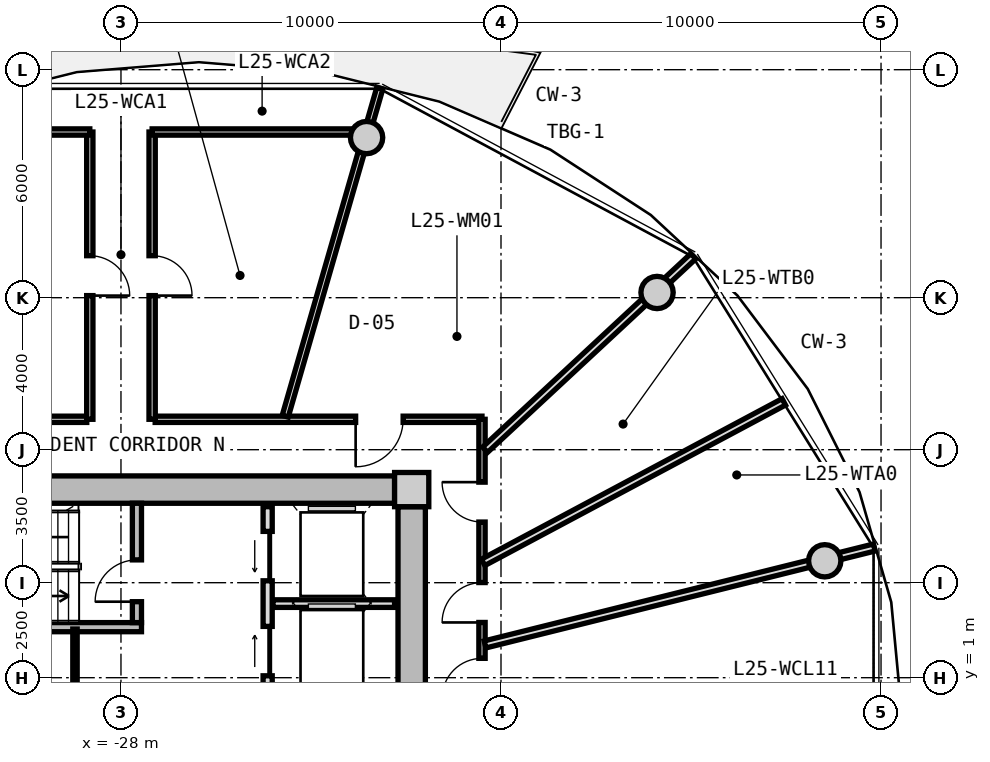
"""IFC4 building model, lengths in metres.
Left out: names, types, materials, properties, quantities, classifications, styles, units other than length and angle.
Written with IfcOpenShell. Run it as: python <this file> out.ifc"""

import sys

from ifc_helpers import new_model, si_unit, direction, frame, frame_2d, origin, origin_2d, place, context, subcontext, project, spatial, rectangle, circle, extrude, source, transform, mapped, element, fill, save


model = new_model("IFC4")
c1 = context("Model", 3, precision=1e-05, world=origin(), true_north=direction((0.0, 1.0)))
c2 = subcontext(c1, "Body", "Model", "MODEL_VIEW")
j1 = project(units=[si_unit("LENGTHUNIT", "METRE"), si_unit("PLANEANGLEUNIT", "RADIAN")], contexts=[c1])
p1 = place(None, origin())
s1 = spatial("IfcSite", under=j1, at=p1, CompositionType="ELEMENT")
p2 = place(p1, origin())
s2 = spatial("IfcBuilding", under=s1, at=p2, CompositionType="ELEMENT")
p3 = place(p2, frame((0.0, 0.0, 84.05)))
s3 = spatial("IfcBuildingStorey", under=s2, at=p3, CompositionType="ELEMENT", Elevation=84.05)
m1 = source(origin(), c2, "Body", "SweptSolid", [
    extrude(rectangle(XDim=0.9, YDim=0.9, at=origin_2d()), origin(), (0.0, 0.0, 1.0), 3.05),
])
p4 = place(p3, frame((-20.35, 5.95, 0.0), z_axis=(0.0, 0.0, 1.0), x_axis=(1.0, 0.0, 0.0)))
e1 = element("IfcColumn", 1, at=p4, inside=s3, PredefinedType="COLUMN", context=c2, shape_type="MappedRepresentation", body=[
    mapped(m1, transform((0.0, 0.0, 0.0), x_axis=(1.0, 0.0, 0.0), y_axis=(0.0, 1.0, 0.0), z_axis=(0.0, 0.0, 1.0), scale=1.0)),
])
m2 = source(origin(), c2, "Body", "SweptSolid", [
    extrude(rectangle(XDim=14.4, YDim=0.72, at=frame_2d((7.2, 0.0))), origin(), (0.0, 0.0, 1.0), 2.79),
])
p5 = place(p3, frame((-35.2, 5.95, 0.0), z_axis=(0.0, 0.0, 1.0), x_axis=(1.0, 0.0, 0.0)))
e2 = element("IfcWall", 2, at=p5, inside=s3, PredefinedType="SHEAR", context=c2, shape_type="MappedRepresentation", body=[
    mapped(m2, transform((0.0, 0.0, 0.0), x_axis=(1.0, 0.0, 0.0), y_axis=(0.0, 1.0, 0.0), z_axis=(0.0, 0.0, 1.0), scale=1.0)),
])
m3 = source(origin(), c2, "Body", "SweptSolid", [
    extrude(rectangle(XDim=11.0, YDim=0.72, at=frame_2d((5.5, 0.0))), origin(), (0.0, 0.0, 1.0), 2.79),
])
p6 = place(p3, frame((-20.35, 5.5, 0.0), z_axis=(0.0, 0.0, 1.0), x_axis=(0.0, -1.0, 0.0)))
e3 = element("IfcWall", 3, at=p6, inside=s3, PredefinedType="SHEAR", context=c2, shape_type="MappedRepresentation", body=[
    mapped(m3, transform((0.0, 0.0, 0.0), x_axis=(1.0, 0.0, 0.0), y_axis=(0.0, 1.0, 0.0), z_axis=(0.0, 0.0, 1.0), scale=1.0)),
])
p7 = place(p6, frame((5.65, 0.0, 0.0)))
e4 = element("IfcOpeningElement", 4, at=p7, cuts=e3, PredefinedType="OPENING", context=c2, shape_type="SweptSolid", body=[
    extrude(rectangle(XDim=1.2, YDim=2.15, at=frame_2d((0.6, 1.075))), frame((0.0, 0.37, 0.0), z_axis=(0.0, -1.0, 0.0), x_axis=(1.0, 0.0, 0.0)), (0.0, 0.0, 1.0), 0.74),
])
m4 = source(origin(), c2, "Body", "SweptSolid", [
    extrude(circle(Radius=0.425, at=origin_2d()), origin(), (0.0, 0.0, 1.0), 3.05),
])
for number, where, z_axis, x_axis in (
    (5, (-9.481, 4.076, 0.0), (0.0, 0.0, 1.0), (1.0, 0.0, 0.0)),
    (6, (-13.894, 11.137, 0.0), (0.0, 0.0, 1.0), (1.0, 0.0, 0.0)),
    (7, (-21.537, 15.213, 0.0), (0.0, 0.0, 1.0), (1.0, 0.0, 0.0)),
):
    element("IfcColumn", number, at=place(p3, frame(where, z_axis=z_axis, x_axis=x_axis)), inside=s3, PredefinedType="COLUMN", context=c2, shape_type="MappedRepresentation", body=[
        mapped(m4, transform((0.0, 0.0, 0.0), x_axis=(1.0, 0.0, 0.0), y_axis=(0.0, 1.0, 0.0), z_axis=(0.0, 0.0, 1.0), scale=1.0)),
    ])
m5 = source(origin(), c2, "Body", "SweptSolid", [
    extrude(rectangle(XDim=7.83, YDim=0.24, at=frame_2d((3.915, 0.0))), origin(), (0.0, 0.0, 1.0), 2.79),
])
p8 = place(p3, frame((-35.29, 2.33, 0.0), z_axis=(0.0, 0.0, 1.0), x_axis=(1.0, 0.0, 0.0)))
e8 = element("IfcWall", 8, at=p8, inside=s3, PredefinedType="PARTITIONING", context=c2, shape_type="MappedRepresentation", body=[
    mapped(m5, transform((0.0, 0.0, 0.0), x_axis=(1.0, 0.0, 0.0), y_axis=(0.0, 1.0, 0.0), z_axis=(0.0, 0.0, 1.0), scale=1.0)),
])
m6 = source(origin(), c2, "Body", "SweptSolid", [
    extrude(rectangle(XDim=3.14, YDim=0.24, at=frame_2d((1.57, 0.0))), origin(), (0.0, 0.0, 1.0), 2.79),
])
p9 = place(p3, frame((-27.58, 2.45, 0.0), z_axis=(0.0, 0.0, 1.0), x_axis=(0.0, 1.0, 0.0)))
e9 = element("IfcWall", 9, at=p9, inside=s3, PredefinedType="PARTITIONING", context=c2, shape_type="MappedRepresentation", body=[
    mapped(m6, transform((0.0, 0.0, 0.0), x_axis=(1.0, 0.0, 0.0), y_axis=(0.0, 1.0, 0.0), z_axis=(0.0, 0.0, 1.0), scale=1.0)),
])
p10 = place(p9, frame((0.55, 0.0, 0.0)))
e10 = element("IfcOpeningElement", 10, at=p10, cuts=e9, PredefinedType="OPENING", context=c2, shape_type="SweptSolid", body=[
    extrude(rectangle(XDim=1.1, YDim=2.15, at=frame_2d((0.55, 1.075))), frame((0.0, 0.13, 0.0), z_axis=(0.0, -1.0, 0.0), x_axis=(1.0, 0.0, 0.0)), (0.0, 0.0, 1.0), 0.26),
])
m7 = source(origin(), c2, "Body", "SweptSolid", [
    extrude(rectangle(XDim=5.0, YDim=0.24, at=frame_2d((2.5, 0.0))), origin(), (0.0, 0.0, 1.0), 2.775),
])
p11 = place(p3, frame((-24.14, 0.5, 0.0), z_axis=(0.0, 0.0, 1.0), x_axis=(0.0, 1.0, 0.0)))
e11 = element("IfcWall", 11, at=p11, inside=s3, PredefinedType="PARTITIONING", context=c2, shape_type="MappedRepresentation", body=[
    mapped(m7, transform((0.0, 0.0, 0.0), x_axis=(1.0, 0.0, 0.0), y_axis=(0.0, 1.0, 0.0), z_axis=(0.0, 0.0, 1.0), scale=1.0)),
])
p12 = place(p11, frame((3.05, 0.0, 0.0)))
e12 = element("IfcOpeningElement", 12, at=p12, cuts=e11, PredefinedType="OPENING", context=c2, shape_type="SweptSolid", body=[
    extrude(rectangle(XDim=1.3, YDim=2.2, at=frame_2d((0.65, 1.1))), frame((0.0, 0.13, 0.0), z_axis=(0.0, -1.0, 0.0), x_axis=(1.0, 0.0, 0.0)), (0.0, 0.0, 1.0), 0.26),
])
p13 = place(p11, frame((0.55, 0.0, 0.0)))
e13 = element("IfcOpeningElement", 13, at=p13, cuts=e11, PredefinedType="OPENING", context=c2, shape_type="SweptSolid", body=[
    extrude(rectangle(XDim=1.3, YDim=2.2, at=frame_2d((0.65, 1.1))), frame((0.0, 0.13, 0.0), z_axis=(0.0, -1.0, 0.0), x_axis=(1.0, 0.0, 0.0)), (0.0, 0.0, 1.0), 0.26),
])
m8 = source(origin(), c2, "Body", "SweptSolid", [
    extrude(rectangle(XDim=3.2, YDim=0.2, at=frame_2d((1.6, 0.0))), origin(), (0.0, 0.0, 1.0), 2.775),
])
p14 = place(p3, frame((-24.0, 2.95, 0.0), z_axis=(0.0, 0.0, 1.0), x_axis=(1.0, 0.0, 0.0)))
e14 = element("IfcWall", 14, at=p14, inside=s3, PredefinedType="PARTITIONING", context=c2, shape_type="MappedRepresentation", body=[
    mapped(m8, transform((0.0, 0.0, 0.0), x_axis=(1.0, 0.0, 0.0), y_axis=(0.0, 1.0, 0.0), z_axis=(0.0, 0.0, 1.0), scale=1.0)),
])
m9 = source(origin(), c2, "Body", "SweptSolid", [
    extrude(rectangle(XDim=2.33, YDim=0.115, at=frame_2d((1.165, 0.0))), origin(), (0.0, 0.0, 1.0), 2.775),
])
p15 = place(p3, frame((-29.21, -0.05, 0.0), z_axis=(0.0, 0.0, 1.0), x_axis=(0.0, 1.0, 0.0)))
e15 = element("IfcWall", 15, at=p15, inside=s3, PredefinedType="PARTITIONING", context=c2, shape_type="MappedRepresentation", body=[
    mapped(m9, transform((0.0, 0.0, 0.0), x_axis=(1.0, 0.0, 0.0), y_axis=(0.0, 1.0, 0.0), z_axis=(0.0, 0.0, 1.0), scale=1.0)),
])
m10 = source(origin(), c2, "Body", "SweptSolid", [
    extrude(rectangle(XDim=8.6, YDim=0.165, at=frame_2d((4.3, 0.0))), origin(), (0.0, 0.0, 1.0), 2.775),
])
p16 = place(p3, frame((-37.5, 7.8, 0.0), z_axis=(0.0, 0.0, 1.0), x_axis=(1.0, 0.0, 0.0)))
e16 = element("IfcWall", 16, at=p16, inside=s3, PredefinedType="PARTITIONING", context=c2, shape_type="MappedRepresentation", body=[
    mapped(m10, transform((0.0, 0.0, 0.0), x_axis=(1.0, 0.0, 0.0), y_axis=(0.0, 1.0, 0.0), z_axis=(0.0, 0.0, 1.0), scale=1.0)),
])
p17 = place(p3, frame((-27.1, 7.8, 0.0), z_axis=(0.0, 0.0, 1.0), x_axis=(1.0, 0.0, 0.0)))
e17 = element("IfcWall", 17, at=p17, inside=s3, PredefinedType="PARTITIONING", context=c2, shape_type="MappedRepresentation", body=[
    mapped(m10, transform((0.0, 0.0, 0.0), x_axis=(1.0, 0.0, 0.0), y_axis=(0.0, 1.0, 0.0), z_axis=(0.0, 0.0, 1.0), scale=1.0)),
])
p18 = place(p17, frame((5.275, 0.0, 0.0)))
e18 = element("IfcOpeningElement", 18, at=p18, cuts=e17, PredefinedType="OPENING", context=c2, shape_type="SweptSolid", body=[
    extrude(rectangle(XDim=1.25, YDim=2.2, at=frame_2d((0.625, 1.1))), frame((0.0, 0.093, 0.0), z_axis=(0.0, -1.0, 0.0), x_axis=(1.0, 0.0, 0.0)), (0.0, 0.0, 1.0), 0.185),
])
m11 = source(origin(), c2, "Body", "SweptSolid", [
    extrude(rectangle(XDim=15.6, YDim=0.165, at=frame_2d((7.8, 0.0))), origin(), (0.0, 0.0, 1.0), 2.775),
])
p19 = place(p3, frame((-18.5, 7.8, 0.0), z_axis=(0.0, 0.0, 1.0), x_axis=(0.0, -1.0, 0.0)))
e19 = element("IfcWall", 19, at=p19, inside=s3, PredefinedType="PARTITIONING", context=c2, shape_type="MappedRepresentation", body=[
    mapped(m11, transform((0.0, 0.0, 0.0), x_axis=(1.0, 0.0, 0.0), y_axis=(0.0, 1.0, 0.0), z_axis=(0.0, 0.0, 1.0), scale=1.0)),
])
p20 = place(p19, frame((12.002, 0.0, 0.0)))
e20 = element("IfcOpeningElement", 20, at=p20, cuts=e19, PredefinedType="OPENING", context=c2, shape_type="SweptSolid", body=[
    extrude(rectangle(XDim=1.05, YDim=2.15, at=frame_2d((0.525, 1.075))), frame((0.0, 0.093, 0.0), z_axis=(0.0, -1.0, 0.0), x_axis=(1.0, 0.0, 0.0)), (0.0, 0.0, 1.0), 0.185),
])
p21 = place(p19, frame((10.211, 0.0, 0.0)))
e21 = element("IfcOpeningElement", 21, at=p21, cuts=e19, PredefinedType="OPENING", context=c2, shape_type="SweptSolid", body=[
    extrude(rectangle(XDim=1.05, YDim=2.15, at=frame_2d((0.525, 1.075))), frame((0.0, 0.093, 0.0), z_axis=(0.0, -1.0, 0.0), x_axis=(1.0, 0.0, 0.0)), (0.0, 0.0, 1.0), 0.185),
])
p22 = place(p19, frame((7.722, 0.0, 0.0)))
e22 = element("IfcOpeningElement", 22, at=p22, cuts=e19, PredefinedType="OPENING", context=c2, shape_type="SweptSolid", body=[
    extrude(rectangle(XDim=1.05, YDim=2.15, at=frame_2d((0.525, 1.075))), frame((0.0, 0.093, 0.0), z_axis=(0.0, -1.0, 0.0), x_axis=(1.0, 0.0, 0.0)), (0.0, 0.0, 1.0), 0.185),
])
p23 = place(p19, frame((6.291, 0.0, 0.0)))
e23 = element("IfcOpeningElement", 23, at=p23, cuts=e19, PredefinedType="OPENING", context=c2, shape_type="SweptSolid", body=[
    extrude(rectangle(XDim=1.05, YDim=2.15, at=frame_2d((0.525, 1.075))), frame((0.0, 0.093, 0.0), z_axis=(0.0, -1.0, 0.0), x_axis=(1.0, 0.0, 0.0)), (0.0, 0.0, 1.0), 0.185),
])
p24 = place(p19, frame((4.296, 0.0, 0.0)))
e24 = element("IfcOpeningElement", 24, at=p24, cuts=e19, PredefinedType="OPENING", context=c2, shape_type="SweptSolid", body=[
    extrude(rectangle(XDim=1.05, YDim=2.15, at=frame_2d((0.525, 1.075))), frame((0.0, 0.093, 0.0), z_axis=(0.0, -1.0, 0.0), x_axis=(1.0, 0.0, 0.0)), (0.0, 0.0, 1.0), 0.185),
])
p25 = place(p19, frame((1.654, 0.0, 0.0)))
e25 = element("IfcOpeningElement", 25, at=p25, cuts=e19, PredefinedType="OPENING", context=c2, shape_type="SweptSolid", body=[
    extrude(rectangle(XDim=1.05, YDim=2.15, at=frame_2d((0.525, 1.075))), frame((0.0, 0.093, 0.0), z_axis=(0.0, -1.0, 0.0), x_axis=(1.0, 0.0, 0.0)), (0.0, 0.0, 1.0), 0.185),
])
m12 = source(origin(), c2, "Body", "SweptSolid", [
    extrude(rectangle(XDim=8.989, YDim=0.165, at=frame_2d((4.495, 0.0))), origin(), (0.0, 0.0, 1.0), 2.275),
])
p26 = place(p3, frame((-23.678, 7.88, 0.0), z_axis=(0.0, 0.0, 1.0), x_axis=(0.27702323008, 0.960863221274, 0.0)))
e26 = element("IfcWall", 26, at=p26, inside=s3, PredefinedType="PARTITIONING", context=c2, shape_type="MappedRepresentation", body=[
    mapped(m12, transform((0.0, 0.0, 0.0), x_axis=(1.0, 0.0, 0.0), y_axis=(0.0, 1.0, 0.0), z_axis=(0.0, 0.0, 1.0), scale=1.0)),
])
m13 = source(origin(), c2, "Body", "SweptSolid", [
    extrude(rectangle(XDim=7.56, YDim=0.165, at=frame_2d((3.78, 0.0))), origin(), (0.0, 0.0, 1.0), 2.775),
])
p27 = place(p3, frame((-28.82, 7.8, 0.0), z_axis=(0.0, 0.0, 1.0), x_axis=(0.0, 1.0, 0.0)))
e27 = element("IfcWall", 27, at=p27, inside=s3, PredefinedType="PARTITIONING", context=c2, shape_type="MappedRepresentation", body=[
    mapped(m13, transform((0.0, 0.0, 0.0), x_axis=(1.0, 0.0, 0.0), y_axis=(0.0, 1.0, 0.0), z_axis=(0.0, 0.0, 1.0), scale=1.0)),
])
p28 = place(p27, frame((3.255, 0.0, 0.0)))
e28 = element("IfcOpeningElement", 28, at=p28, cuts=e27, PredefinedType="OPENING", context=c2, shape_type="SweptSolid", body=[
    extrude(rectangle(XDim=1.05, YDim=2.15, at=frame_2d((0.525, 1.075))), frame((0.0, 0.093, 0.0), z_axis=(0.0, -1.0, 0.0), x_axis=(1.0, 0.0, 0.0)), (0.0, 0.0, 1.0), 0.185),
])
m14 = source(origin(), c2, "Body", "SweptSolid", [
    extrude(rectangle(XDim=4.307, YDim=0.165, at=frame_2d((2.153, 0.0))), origin(), (0.0, 0.0, 1.0), 2.275),
])
p29 = place(p3, frame((-33.127, 15.36, 0.0), z_axis=(0.0, 0.0, 1.0), x_axis=(1.0, 0.0, 0.0)))
e29 = element("IfcWall", 29, at=p29, inside=s3, PredefinedType="PARTITIONING", context=c2, shape_type="MappedRepresentation", body=[
    mapped(m14, transform((0.0, 0.0, 0.0), x_axis=(1.0, 0.0, 0.0), y_axis=(0.0, 1.0, 0.0), z_axis=(0.0, 0.0, 1.0), scale=1.0)),
])
p30 = place(p3, frame((-27.18, 7.8, 0.0), z_axis=(0.0, 0.0, 1.0), x_axis=(0.0, 1.0, 0.0)))
e30 = element("IfcWall", 30, at=p30, inside=s3, PredefinedType="PARTITIONING", context=c2, shape_type="MappedRepresentation", body=[
    mapped(m13, transform((0.0, 0.0, 0.0), x_axis=(1.0, 0.0, 0.0), y_axis=(0.0, 1.0, 0.0), z_axis=(0.0, 0.0, 1.0), scale=1.0)),
])
p31 = place(p30, frame((3.255, 0.0, 0.0)))
e31 = element("IfcOpeningElement", 31, at=p31, cuts=e30, PredefinedType="OPENING", context=c2, shape_type="SweptSolid", body=[
    extrude(rectangle(XDim=1.05, YDim=2.15, at=frame_2d((0.525, 1.075))), frame((0.0, 0.093, 0.0), z_axis=(0.0, -1.0, 0.0), x_axis=(1.0, 0.0, 0.0)), (0.0, 0.0, 1.0), 0.185),
])
m15 = source(origin(), c2, "Body", "SweptSolid", [
    extrude(rectangle(XDim=5.814, YDim=0.165, at=frame_2d((2.907, 0.0))), origin(), (0.0, 0.0, 1.0), 2.275),
])
p32 = place(p3, frame((-27.18, 15.36, 0.0), z_axis=(0.0, 0.0, 1.0), x_axis=(1.0, 0.0, 0.0)))
e32 = element("IfcWall", 32, at=p32, inside=s3, PredefinedType="PARTITIONING", context=c2, shape_type="MappedRepresentation", body=[
    mapped(m15, transform((0.0, 0.0, 0.0), x_axis=(1.0, 0.0, 0.0), y_axis=(0.0, 1.0, 0.0), z_axis=(0.0, 0.0, 1.0), scale=1.0)),
])
m16 = source(origin(), c2, "Body", "SweptSolid", [
    extrude(rectangle(XDim=10.556, YDim=0.19, at=frame_2d((5.278, 0.0))), origin(), (0.0, 0.0, 1.0), 2.275),
])
p33 = place(p3, frame((-18.42, 1.875, 0.0), z_axis=(0.0, 0.0, 1.0), x_axis=(0.970363857851, 0.241648470667, 0.0)))
e33 = element("IfcWall", 33, at=p33, inside=s3, PredefinedType="PARTITIONING", context=c2, shape_type="MappedRepresentation", body=[
    mapped(m16, transform((0.0, 0.0, 0.0), x_axis=(1.0, 0.0, 0.0), y_axis=(0.0, 1.0, 0.0), z_axis=(0.0, 0.0, 1.0), scale=1.0)),
])
m17 = source(origin(), c2, "Body", "SweptSolid", [
    extrude(rectangle(XDim=7.482, YDim=0.19, at=frame_2d((3.741, 0.0))), origin(), (0.0, 0.0, 1.0), 2.275),
])
p34 = place(p3, frame((-18.42, 6.998, 0.0), z_axis=(0.0, 0.0, 1.0), x_axis=(0.732508698043, 0.680757671489, 0.0)))
e34 = element("IfcWall", 34, at=p34, inside=s3, PredefinedType="PARTITIONING", context=c2, shape_type="MappedRepresentation", body=[
    mapped(m17, transform((0.0, 0.0, 0.0), x_axis=(1.0, 0.0, 0.0), y_axis=(0.0, 1.0, 0.0), z_axis=(0.0, 0.0, 1.0), scale=1.0)),
])
m18 = source(origin(), c2, "Body", "SweptSolid", [
    extrude(rectangle(XDim=8.968, YDim=0.19, at=frame_2d((4.484, 0.0))), origin(), (0.0, 0.0, 1.0), 2.775),
])
p35 = place(p3, frame((-18.47, 4.036, 0.0), z_axis=(0.0, 0.0, 1.0), x_axis=(0.882202936563, 0.47086938605, 0.0)))
e35 = element("IfcWall", 35, at=p35, inside=s3, PredefinedType="PARTITIONING", context=c2, shape_type="MappedRepresentation", body=[
    mapped(m18, transform((0.0, 0.0, 0.0), x_axis=(1.0, 0.0, 0.0), y_axis=(0.0, 1.0, 0.0), z_axis=(0.0, 0.0, 1.0), scale=1.0)),
])
m19 = source(origin(), c2, "Body", "SweptSolid", [
    extrude(rectangle(XDim=1.1, YDim=2.15, at=frame_2d((0.55, 1.075))), frame((0.0, 0.025, 0.0), z_axis=(0.0, -1.0, 0.0), x_axis=(1.0, 0.0, 0.0)), (0.0, 0.0, 1.0), 0.05),
])
p36 = place(p10, origin())
e36 = element("IfcDoor", 36, at=p36, inside=s3, OperationType="SINGLE_SWING_LEFT", PredefinedType="DOOR", context=c2, shape_type="MappedRepresentation", body=[
    mapped(m19, transform((0.0, 0.0, 0.0), x_axis=(1.0, 0.0, 0.0), y_axis=(0.0, 1.0, 0.0), z_axis=(0.0, 0.0, 1.0), scale=1.0)),
])
fill(e10, e36)
m20 = source(origin(), c2, "Body", "SweptSolid", [
    extrude(rectangle(XDim=1.3, YDim=2.2, at=frame_2d((0.65, 1.1))), frame((0.0, 0.025, 0.0), z_axis=(0.0, -1.0, 0.0), x_axis=(1.0, 0.0, 0.0)), (0.0, 0.0, 1.0), 0.05),
])
p37 = place(p12, origin())
e37 = element("IfcDoor", 37, at=p37, inside=s3, OperationType="SLIDING_TO_LEFT", PredefinedType="DOOR", context=c2, shape_type="MappedRepresentation", body=[
    mapped(m20, transform((0.0, 0.0, 0.0), x_axis=(1.0, 0.0, 0.0), y_axis=(0.0, 1.0, 0.0), z_axis=(0.0, 0.0, 1.0), scale=1.0)),
])
fill(e12, e37)
p38 = place(p13, origin())
e38 = element("IfcDoor", 38, at=p38, inside=s3, OperationType="SLIDING_TO_RIGHT", PredefinedType="DOOR", context=c2, shape_type="MappedRepresentation", body=[
    mapped(m20, transform((0.0, 0.0, 0.0), x_axis=(1.0, 0.0, 0.0), y_axis=(0.0, 1.0, 0.0), z_axis=(0.0, 0.0, 1.0), scale=1.0)),
])
fill(e13, e38)
m21 = source(origin(), c2, "Body", "SweptSolid", [
    extrude(rectangle(XDim=1.05, YDim=2.15, at=frame_2d((0.525, 1.075))), frame((0.0, 0.025, 0.0), z_axis=(0.0, -1.0, 0.0), x_axis=(1.0, 0.0, 0.0)), (0.0, 0.0, 1.0), 0.05),
])
p39 = place(p28, frame((1.05, 0.0, 0.0), z_axis=(0.0, 0.0, 1.0), x_axis=(-1.0, 0.0, 0.0)))
e39 = element("IfcDoor", 39, at=p39, inside=s3, OperationType="SINGLE_SWING_RIGHT", PredefinedType="DOOR", context=c2, shape_type="MappedRepresentation", body=[
    mapped(m21, transform((0.0, 0.0, 0.0), x_axis=(1.0, 0.0, 0.0), y_axis=(0.0, 1.0, 0.0), z_axis=(0.0, 0.0, 1.0), scale=1.0)),
])
fill(e28, e39)
p40 = place(p31, frame((1.05, 0.0, 0.0), z_axis=(0.0, 0.0, 1.0), x_axis=(-1.0, 0.0, 0.0)))
e40 = element("IfcDoor", 40, at=p40, inside=s3, OperationType="SINGLE_SWING_RIGHT", PredefinedType="DOOR", context=c2, shape_type="MappedRepresentation", body=[
    mapped(m21, transform((0.0, 0.0, 0.0), x_axis=(1.0, 0.0, 0.0), y_axis=(0.0, 1.0, 0.0), z_axis=(0.0, 0.0, 1.0), scale=1.0)),
])
fill(e31, e40)
p41 = place(p23, frame((1.05, 0.0, 0.0), z_axis=(0.0, 0.0, 1.0), x_axis=(-1.0, 0.0, 0.0)))
e41 = element("IfcDoor", 41, at=p41, inside=s3, OperationType="SINGLE_SWING_LEFT", PredefinedType="DOOR", context=c2, shape_type="MappedRepresentation", body=[
    mapped(m21, transform((0.0, 0.0, 0.0), x_axis=(1.0, 0.0, 0.0), y_axis=(0.0, 1.0, 0.0), z_axis=(0.0, 0.0, 1.0), scale=1.0)),
])
fill(e23, e41)
p42 = place(p24, frame((1.05, 0.0, 0.0), z_axis=(0.0, 0.0, 1.0), x_axis=(-1.0, 0.0, 0.0)))
e42 = element("IfcDoor", 42, at=p42, inside=s3, OperationType="SINGLE_SWING_LEFT", PredefinedType="DOOR", context=c2, shape_type="MappedRepresentation", body=[
    mapped(m21, transform((0.0, 0.0, 0.0), x_axis=(1.0, 0.0, 0.0), y_axis=(0.0, 1.0, 0.0), z_axis=(0.0, 0.0, 1.0), scale=1.0)),
])
fill(e24, e42)
p43 = place(p25, frame((1.05, 0.0, 0.0), z_axis=(0.0, 0.0, 1.0), x_axis=(-1.0, 0.0, 0.0)))
e43 = element("IfcDoor", 43, at=p43, inside=s3, OperationType="SINGLE_SWING_RIGHT", PredefinedType="DOOR", context=c2, shape_type="MappedRepresentation", body=[
    mapped(m21, transform((0.0, 0.0, 0.0), x_axis=(1.0, 0.0, 0.0), y_axis=(0.0, 1.0, 0.0), z_axis=(0.0, 0.0, 1.0), scale=1.0)),
])
fill(e25, e43)
m22 = source(origin(), c2, "Body", "SweptSolid", [
    extrude(rectangle(XDim=1.25, YDim=2.2, at=frame_2d((0.625, 1.1))), frame((0.0, 0.025, 0.0), z_axis=(0.0, -1.0, 0.0), x_axis=(1.0, 0.0, 0.0)), (0.0, 0.0, 1.0), 0.05),
])
p44 = place(p18, frame((1.25, 0.0, 0.0), z_axis=(0.0, 0.0, 1.0), x_axis=(-1.0, 0.0, 0.0)))
e44 = element("IfcDoor", 44, at=p44, inside=s3, OperationType="SINGLE_SWING_RIGHT", PredefinedType="DOOR", context=c2, shape_type="MappedRepresentation", body=[
    mapped(m22, transform((0.0, 0.0, 0.0), x_axis=(1.0, 0.0, 0.0), y_axis=(0.0, 1.0, 0.0), z_axis=(0.0, 0.0, 1.0), scale=1.0)),
])
fill(e18, e44)
save(model, sys.argv[1])
